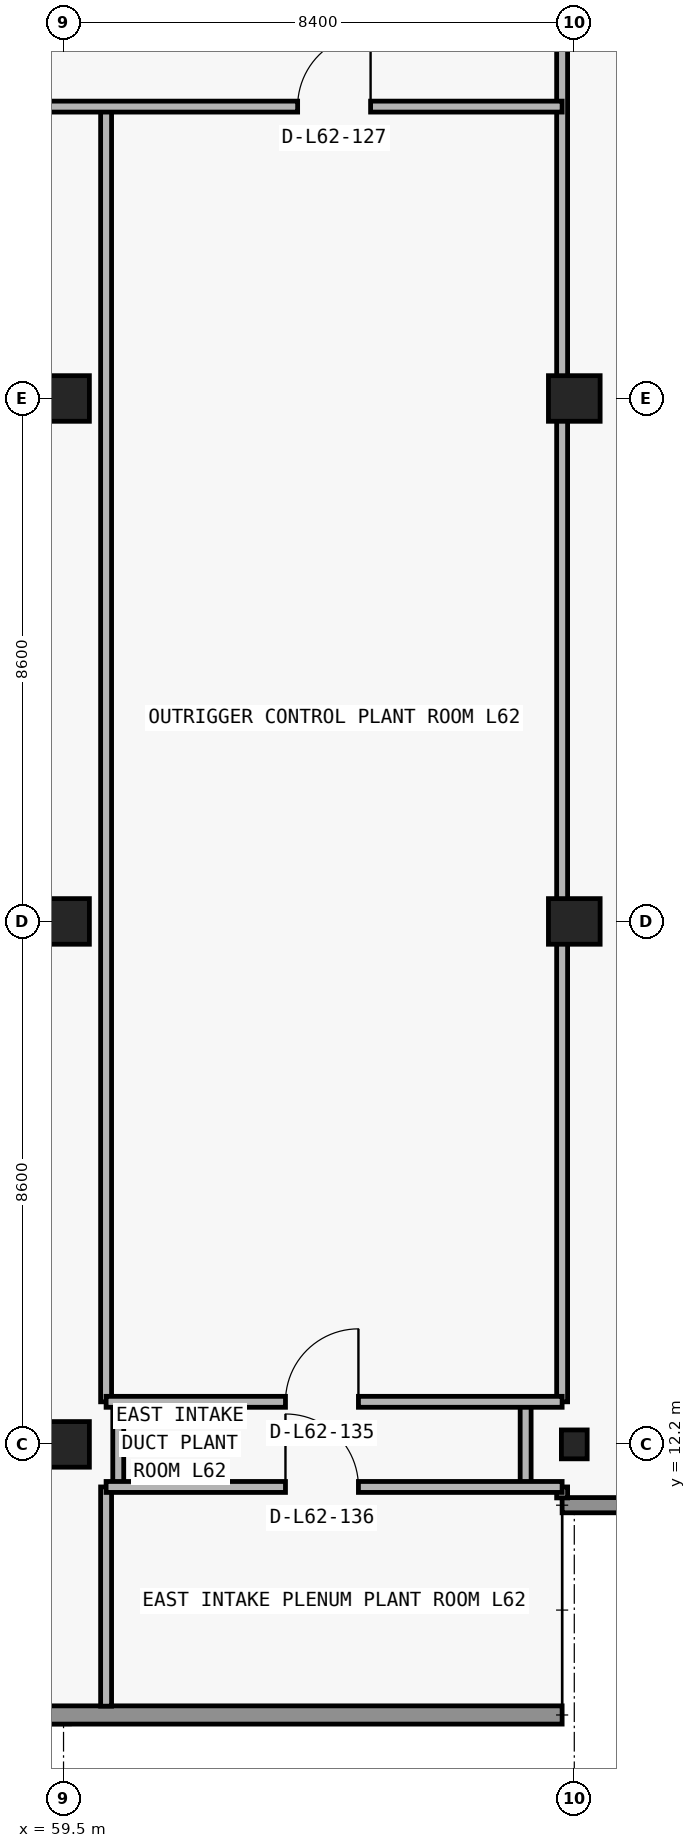
"""IFC4 building model, lengths in metres.
Left out: names, types, materials, properties, quantities, classifications, styles, units other than length and angle.
Written with IfcOpenShell. Run it as: python <this file> out.ifc"""

import sys

from ifc_helpers import new_model, si_unit, direction, frame, frame_2d, origin, origin_2d, place, context, subcontext, project, spatial, rectangle, i_section, extrude, element, fill, save


model = new_model("IFC4")
c1 = context("Model", 3, precision=1e-05, world=origin(), true_north=direction((0.0, 1.0)))
c2 = subcontext(c1, "Body", "Model", "MODEL_VIEW")
j1 = project(units=[si_unit("LENGTHUNIT", "METRE"), si_unit("PLANEANGLEUNIT", "RADIAN")], contexts=[c1])
p1 = place(None, origin())
s1 = spatial("IfcSite", under=j1, at=p1, CompositionType="ELEMENT")
p2 = place(p1, origin())
s2 = spatial("IfcBuilding", under=s1, at=p2, CompositionType="ELEMENT")
p3 = place(p2, frame((0.0, 0.0, 221.4)))
s3 = spatial("IfcBuildingStorey", under=s2, at=p3, CompositionType="ELEMENT", Elevation=221.4)
p4 = place(p3, frame((59.5, 12.2, 0.0), z_axis=(0.0, 0.0, 1.0), x_axis=(1.0, 0.0, 0.0)))
e1 = element("IfcColumn", 1, at=p4, inside=s3, PredefinedType="COLUMN", context=c2, shape_type="SweptSolid", body=[
    extrude(rectangle(XDim=0.85, YDim=0.75, at=origin_2d()), origin(), (0.0, 0.0, 1.0), 4.85),
])
p5 = place(p3, frame((67.9, 12.2, 0.0), z_axis=(0.0, 0.0, 1.0), x_axis=(1.0, 0.0, 0.0)))
e2 = element("IfcColumn", 2, at=p5, inside=s3, PredefinedType="COLUMN", context=c2, shape_type="SweptSolid", body=[
    extrude(i_section(OverallWidth=0.424, OverallDepth=0.475, WebThickness=0.048, FlangeThickness=0.077, FilletRadius=0.015, at=origin_2d()), origin(), (0.0, 0.0, 1.0), 4.85),
])
for number, where, z_axis, x_axis in (
    (3, (59.5, 20.8, 0.0), (0.0, 0.0, 1.0), (1.0, 0.0, 0.0)),
    (4, (67.9, 20.8, 0.0), (0.0, 0.0, 1.0), (1.0, 0.0, 0.0)),
    (5, (59.5, 29.4, 0.0), (0.0, 0.0, 1.0), (1.0, 0.0, 0.0)),
    (6, (67.9, 29.4, 0.0), (0.0, 0.0, 1.0), (1.0, 0.0, 0.0)),
):
    element("IfcColumn", number, at=place(p3, frame(where, z_axis=z_axis, x_axis=x_axis)), inside=s3, PredefinedType="COLUMN", context=c2, shape_type="SweptSolid", body=[
        extrude(rectangle(XDim=0.85, YDim=0.75, at=origin_2d()), origin(), (0.0, 0.0, 1.0), 4.85),
    ])
p6 = place(p3, frame((67.7, 7.75, 0.0), z_axis=(0.0, 0.0, 1.0), x_axis=(-1.0, 0.0, 0.0)))
e7 = element("IfcWall", 7, at=p6, inside=s3, PredefinedType="STANDARD", context=c2, shape_type="SweptSolid", body=[
    extrude(rectangle(XDim=57.6, YDim=0.3, at=frame_2d((28.8, 0.0))), origin(), (0.0, 0.0, 1.0), 4.85),
])
p7 = place(p3, frame((67.7, 11.2, 0.0), z_axis=(0.0, 0.0, 1.0), x_axis=(1.0, 0.0, 0.0)))
e8 = element("IfcWall", 8, at=p7, inside=s3, PredefinedType="ELEMENTEDWALL", context=c2, shape_type="SweptSolid", body=[
    extrude(rectangle(XDim=3.85, YDim=0.25, at=frame_2d((1.925, 0.0))), origin(), (0.0, 0.0, 1.0), 4.85),
])
p8 = place(p3, frame((60.2, 7.895, 0.0), z_axis=(0.0, 0.0, 1.0), x_axis=(0.0, 1.0, 0.0)))
e9 = element("IfcWall", 9, at=p8, inside=s3, PredefinedType="PARTITIONING", context=c2, shape_type="SweptSolid", body=[
    extrude(rectangle(XDim=3.605, YDim=0.18, at=frame_2d((1.802, 0.0))), origin(), (0.0, 0.0, 1.0), 4.85),
])
p9 = place(p3, frame((60.2, 12.9, 0.0), z_axis=(0.0, 0.0, 1.0), x_axis=(0.0, 1.0, 0.0)))
e10 = element("IfcWall", 10, at=p9, inside=s3, PredefinedType="PARTITIONING", context=c2, shape_type="SweptSolid", body=[
    extrude(rectangle(XDim=21.3, YDim=0.18, at=frame_2d((10.65, 0.0))), origin(), (0.0, 0.0, 1.0), 4.85),
])
p10 = place(p3, frame((60.4, 11.505, 0.0), z_axis=(0.0, 0.0, 1.0), x_axis=(0.0, 1.0, 0.0)))
e11 = element("IfcWall", 11, at=p10, inside=s3, PredefinedType="PARTITIONING", context=c2, shape_type="SweptSolid", body=[
    extrude(rectangle(XDim=1.39, YDim=0.18, at=frame_2d((0.695, 0.0))), origin(), (0.0, 0.0, 1.0), 4.85),
])
p11 = place(p3, frame((67.1, 11.5, 0.0), z_axis=(0.0, 0.0, 1.0), x_axis=(0.0, 1.0, 0.0)))
e12 = element("IfcWall", 12, at=p11, inside=s3, PredefinedType="PARTITIONING", context=c2, shape_type="SweptSolid", body=[
    extrude(rectangle(XDim=1.4, YDim=0.18, at=frame_2d((0.7, 0.0))), origin(), (0.0, 0.0, 1.0), 4.85),
])
p12 = place(p3, frame((67.7, 11.32, 0.0), z_axis=(0.0, 0.0, 1.0), x_axis=(0.0, 1.0, 0.0)))
e13 = element("IfcWall", 13, at=p12, inside=s3, PredefinedType="PARTITIONING", context=c2, shape_type="SweptSolid", body=[
    extrude(rectangle(XDim=0.18, YDim=0.18, at=frame_2d((0.09, 0.0))), origin(), (0.0, 0.0, 1.0), 4.85),
])
p13 = place(p3, frame((67.7, 12.9, 0.0), z_axis=(0.0, 0.0, 1.0), x_axis=(0.0, 1.0, 0.0)))
e14 = element("IfcWall", 14, at=p13, inside=s3, PredefinedType="PARTITIONING", context=c2, shape_type="SweptSolid", body=[
    extrude(rectangle(XDim=33.98, YDim=0.18, at=frame_2d((16.99, 0.0))), origin(), (0.0, 0.0, 1.0), 3.814),
])
p14 = place(p3, frame((60.2, 11.5, 0.0), z_axis=(0.0, 0.0, 1.0), x_axis=(1.0, 0.0, 0.0)))
e15 = element("IfcWall", 15, at=p14, inside=s3, PredefinedType="PARTITIONING", context=c2, shape_type="SweptSolid", body=[
    extrude(rectangle(XDim=7.5, YDim=0.18, at=frame_2d((3.75, 0.0))), origin(), (0.0, 0.0, 1.0), 4.85),
])
p15 = place(p14, frame((2.95, 0.0, 0.0)))
e16 = element("IfcOpeningElement", 16, at=p15, cuts=e15, PredefinedType="OPENING", context=c2, shape_type="SweptSolid", body=[
    extrude(rectangle(XDim=1.2, YDim=2.2, at=frame_2d((0.6, 1.1))), frame((0.0, 0.1, 0.0), z_axis=(0.0, -1.0, 0.0), x_axis=(1.0, 0.0, 0.0)), (0.0, 0.0, 1.0), 0.2),
])
p16 = place(p3, frame((60.2, 12.9, 0.0), z_axis=(0.0, 0.0, 1.0), x_axis=(1.0, 0.0, 0.0)))
e17 = element("IfcWall", 17, at=p16, inside=s3, PredefinedType="PARTITIONING", context=c2, shape_type="SweptSolid", body=[
    extrude(rectangle(XDim=7.5, YDim=0.18, at=frame_2d((3.75, 0.0))), origin(), (0.0, 0.0, 1.0), 4.85),
])
p17 = place(p16, frame((2.95, 0.0, 0.0)))
e18 = element("IfcOpeningElement", 18, at=p17, cuts=e17, PredefinedType="OPENING", context=c2, shape_type="SweptSolid", body=[
    extrude(rectangle(XDim=1.2, YDim=2.2, at=frame_2d((0.6, 1.1))), frame((0.0, 0.1, 0.0), z_axis=(0.0, -1.0, 0.0), x_axis=(1.0, 0.0, 0.0)), (0.0, 0.0, 1.0), 0.2),
])
p18 = place(p3, frame((58.805, 34.2, 0.0), z_axis=(0.0, 0.0, 1.0), x_axis=(1.0, 0.0, 0.0)))
e19 = element("IfcWall", 19, at=p18, inside=s3, PredefinedType="PARTITIONING", context=c2, shape_type="SweptSolid", body=[
    extrude(rectangle(XDim=8.895, YDim=0.18, at=frame_2d((4.448, 0.0))), origin(), (0.0, 0.0, 1.0), 4.85),
])
p19 = place(p18, frame((4.545, 0.0, 0.0)))
e20 = element("IfcOpeningElement", 20, at=p19, cuts=e19, PredefinedType="OPENING", context=c2, shape_type="SweptSolid", body=[
    extrude(rectangle(XDim=1.2, YDim=2.2, at=frame_2d((0.6, 1.1))), frame((0.0, 0.1, 0.0), z_axis=(0.0, -1.0, 0.0), x_axis=(1.0, 0.0, 0.0)), (0.0, 0.0, 1.0), 0.2),
])
p20 = place(p19, origin())
e21 = element("IfcDoor", 21, at=p20, inside=s3, OperationType="SINGLE_SWING_RIGHT", PredefinedType="DOOR", context=c2, shape_type="SweptSolid", body=[
    extrude(rectangle(XDim=1.2, YDim=2.2, at=frame_2d((0.6, 1.1))), frame((0.0, 0.025, 0.0), z_axis=(0.0, -1.0, 0.0), x_axis=(1.0, 0.0, 0.0)), (0.0, 0.0, 1.0), 0.05),
])
fill(e20, e21)
p21 = place(p17, origin())
e22 = element("IfcDoor", 22, at=p21, inside=s3, OperationType="SINGLE_SWING_RIGHT", PredefinedType="DOOR", context=c2, shape_type="SweptSolid", body=[
    extrude(rectangle(XDim=1.2, YDim=2.2, at=frame_2d((0.6, 1.1))), frame((0.0, 0.025, 0.0), z_axis=(0.0, -1.0, 0.0), x_axis=(1.0, 0.0, 0.0)), (0.0, 0.0, 1.0), 0.05),
])
fill(e18, e22)
p22 = place(p15, origin())
e23 = element("IfcDoor", 23, at=p22, inside=s3, OperationType="SINGLE_SWING_LEFT", PredefinedType="DOOR", context=c2, shape_type="SweptSolid", body=[
    extrude(rectangle(XDim=1.2, YDim=2.2, at=frame_2d((0.6, 1.1))), frame((0.0, 0.025, 0.0), z_axis=(0.0, -1.0, 0.0), x_axis=(1.0, 0.0, 0.0)), (0.0, 0.0, 1.0), 0.05),
])
fill(e16, e23)
save(model, sys.argv[1])
